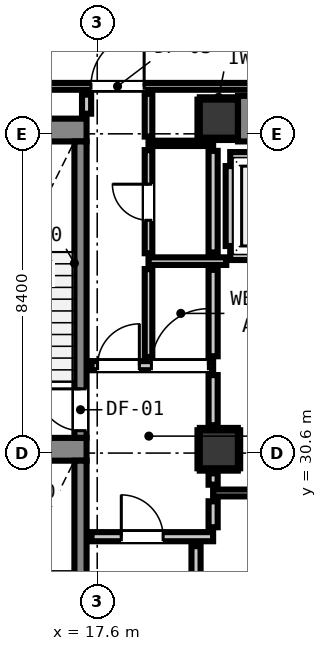
"""IFC4 building model, lengths in metres.
Left out: names, types, materials, properties, quantities, classifications, styles, units other than length and angle.
Written with IfcOpenShell. Run it as: python <this file> out.ifc"""

import sys

from ifc_helpers import new_model, si_unit, direction, frame, frame_2d, origin, origin_2d, place, context, subcontext, project, spatial, rectangle, extrude, element, fill, save


model = new_model("IFC4")
c1 = context("Model", 3, precision=1e-05, world=origin(), true_north=direction((0.0, 1.0)))
c2 = subcontext(c1, "Body", "Model", "MODEL_VIEW")
j1 = project(units=[si_unit("LENGTHUNIT", "METRE"), si_unit("PLANEANGLEUNIT", "RADIAN")], contexts=[c1])
p1 = place(None, origin())
s1 = spatial("IfcSite", under=j1, at=p1, CompositionType="ELEMENT")
p2 = place(p1, origin())
s2 = spatial("IfcBuilding", under=s1, at=p2, CompositionType="ELEMENT")
p3 = place(p2, frame((0.0, 0.0, 9.4)))
s3 = spatial("IfcBuildingStorey", under=s2, at=p3, CompositionType="ELEMENT", Elevation=9.4)
p4 = place(p3, frame((20.8, 39.4, 0.0), z_axis=(0.0, 0.0, 1.0), x_axis=(1.0, 0.0, 0.0)))
e1 = element("IfcColumn", 1, at=p4, inside=s3, PredefinedType="COLUMN", context=c2, shape_type="SweptSolid", body=[
    extrude(rectangle(XDim=1.0, YDim=1.0, at=origin_2d()), origin(), (0.0, 0.0, 1.0), 4.2),
])
p5 = place(p3, frame((13.24, 39.1, 0.0), z_axis=(0.0, 0.0, 1.0), x_axis=(1.0, 0.0, 0.0)))
e2 = element("IfcWall", 2, at=p5, inside=s3, PredefinedType="SHEAR", context=c2, shape_type="SweptSolid", body=[
    extrude(rectangle(XDim=4.08, YDim=0.6, at=frame_2d((2.04, 0.0))), origin(), (0.0, 0.0, 1.0), 4.2),
])
p6 = place(p3, frame((13.905, 30.7, 0.0), z_axis=(0.0, 0.0, 1.0), x_axis=(1.0, 0.0, 0.0)))
e3 = element("IfcWall", 3, at=p6, inside=s3, PredefinedType="SHEAR", context=c2, shape_type="SweptSolid", body=[
    extrude(rectangle(XDim=3.415, YDim=0.6, at=frame_2d((1.708, 0.0))), origin(), (0.0, 0.0, 1.0), 4.2),
])
p7 = place(p3, frame((21.305, 39.4, 0.0), z_axis=(0.0, 0.0, 1.0), x_axis=(1.0, 0.0, 0.0)))
e4 = element("IfcWall", 4, at=p7, inside=s3, PredefinedType="SHEAR", context=c2, shape_type="SweptSolid", body=[
    extrude(rectangle(XDim=7.39, YDim=1.2, at=frame_2d((3.695, 0.0))), origin(), (0.0, 0.0, 1.0), 4.2),
])
p8 = place(p3, frame((17.16, 31.0, 0.0), z_axis=(0.0, 0.0, 1.0), x_axis=(0.0, 1.0, 0.0)))
e5 = element("IfcWall", 5, at=p8, inside=s3, PredefinedType="SHEAR", context=c2, shape_type="SweptSolid", body=[
    extrude(rectangle(XDim=7.8, YDim=0.32, at=frame_2d((3.9, 0.0))), origin(), (0.0, 0.0, 1.0), 4.2),
])
p9 = place(p8, frame((0.19, 0.0, 0.0)))
e6 = element("IfcOpeningElement", 6, at=p9, cuts=e5, PredefinedType="OPENING", context=c2, shape_type="SweptSolid", body=[
    extrude(rectangle(XDim=1.1, YDim=2.15, at=frame_2d((0.55, 1.075))), frame((0.0, 0.17, 0.0), z_axis=(0.0, -1.0, 0.0), x_axis=(1.0, 0.0, 0.0)), (0.0, 0.0, 1.0), 0.34),
])
p10 = place(p3, frame((17.16, 22.6, 0.0), z_axis=(0.0, 0.0, 1.0), x_axis=(0.0, 1.0, 0.0)))
e7 = element("IfcWall", 7, at=p10, inside=s3, PredefinedType="SHEAR", context=c2, shape_type="SweptSolid", body=[
    extrude(rectangle(XDim=7.8, YDim=0.32, at=frame_2d((3.9, 0.0))), origin(), (0.0, 0.0, 1.0), 4.2),
])
p11 = place(p10, frame((0.19, 0.0, 0.0)))
e8 = element("IfcOpeningElement", 8, at=p11, cuts=e7, PredefinedType="OPENING", context=c2, shape_type="SweptSolid", body=[
    extrude(rectangle(XDim=1.1, YDim=2.15, at=frame_2d((0.55, 1.075))), frame((0.0, 0.17, 0.0), z_axis=(0.0, -1.0, 0.0), x_axis=(1.0, 0.0, 0.0)), (0.0, 0.0, 1.0), 0.34),
])
p12 = place(p3, frame((20.8, 30.7, 0.0), z_axis=(0.0, 0.0, 1.0), x_axis=(1.0, 0.0, 0.0)))
e9 = element("IfcColumn", 9, at=p12, inside=s3, PredefinedType="COLUMN", context=c2, shape_type="SweptSolid", body=[
    extrude(rectangle(XDim=1.0, YDim=1.0, at=origin_2d()), origin(), (0.0, 0.0, 1.0), 4.2),
])
for number, where, z_axis, x_axis in (
    (10, (21.1, 35.8, 0.0), (0.0, 0.0, 1.0), (1.0, 0.0, 0.0)),
    (11, (21.1, 38.4, 0.0), (0.0, 0.0, 1.0), (1.0, 0.0, 0.0)),
):
    element("IfcWall", number, at=place(p3, frame(where, z_axis=z_axis, x_axis=x_axis)), inside=s3, PredefinedType="PARTITIONING", context=c2, shape_type="SweptSolid", body=[
        extrude(rectangle(XDim=2.2, YDim=0.24, at=frame_2d((1.1, 0.0))), origin(), (0.0, 0.0, 1.0), 3.92),
    ])
p13 = place(p3, frame((21.1, 36.048, 0.0), z_axis=(0.0, 0.0, 1.0), x_axis=(0.0, 1.0, 0.0)))
e12 = element("IfcWall", 12, at=p13, inside=s3, PredefinedType="PARTITIONING", context=c2, shape_type="SweptSolid", body=[
    extrude(rectangle(XDim=2.104, YDim=0.24, at=frame_2d((1.052, 0.0))), origin(), (0.0, 0.0, 1.0), 2.955),
])
p14 = place(p3, frame((17.45, 28.4, 0.0), z_axis=(0.0, 0.0, 1.0), x_axis=(1.0, 0.0, 0.0)))
e13 = element("IfcWall", 13, at=p14, inside=s3, PredefinedType="PARTITIONING", context=c2, shape_type="SweptSolid", body=[
    extrude(rectangle(XDim=3.2, YDim=0.24, at=frame_2d((1.6, 0.0))), origin(), (0.0, 0.0, 1.0), 3.92),
])
p15 = place(p14, frame((0.784, 0.0, 0.0)))
e14 = element("IfcOpeningElement", 14, at=p15, cuts=e13, PredefinedType="OPENING", context=c2, shape_type="SweptSolid", body=[
    extrude(rectangle(XDim=1.1, YDim=2.15, at=frame_2d((0.55, 1.075))), frame((0.0, 0.13, 0.0), z_axis=(0.0, -1.0, 0.0), x_axis=(1.0, 0.0, 0.0)), (0.0, 0.0, 1.0), 0.26),
])
p16 = place(p3, frame((17.45, 32.9, 0.0), z_axis=(0.0, 0.0, 1.0), x_axis=(1.0, 0.0, 0.0)))
e15 = element("IfcWall", 15, at=p16, inside=s3, PredefinedType="PARTITIONING", context=c2, shape_type="SweptSolid", body=[
    extrude(rectangle(XDim=3.2, YDim=0.24, at=frame_2d((1.6, 0.0))), origin(), (0.0, 0.0, 1.0), 3.92),
])
p17 = place(p16, frame((0.159, 0.0, 0.0)))
e16 = element("IfcOpeningElement", 16, at=p17, cuts=e15, PredefinedType="OPENING", context=c2, shape_type="SweptSolid", body=[
    extrude(rectangle(XDim=1.1, YDim=2.15, at=frame_2d((0.55, 1.075))), frame((0.0, 0.13, 0.0), z_axis=(0.0, -1.0, 0.0), x_axis=(1.0, 0.0, 0.0)), (0.0, 0.0, 1.0), 0.26),
])
p18 = place(p16, frame((1.576, 0.0, 0.0)))
e17 = element("IfcOpeningElement", 17, at=p18, cuts=e15, PredefinedType="OPENING", context=c2, shape_type="SweptSolid", body=[
    extrude(rectangle(XDim=1.5, YDim=2.15, at=frame_2d((0.75, 1.075))), frame((0.0, 0.13, 0.0), z_axis=(0.0, -1.0, 0.0), x_axis=(1.0, 0.0, 0.0)), (0.0, 0.0, 1.0), 0.26),
])
p19 = place(p3, frame((18.95, 35.65, 0.0), z_axis=(0.0, 0.0, 1.0), x_axis=(1.0, 0.0, 0.0)))
e18 = element("IfcWall", 18, at=p19, inside=s3, PredefinedType="PARTITIONING", context=c2, shape_type="SweptSolid", body=[
    extrude(rectangle(XDim=2.046, YDim=0.2, at=frame_2d((1.023, 0.0))), origin(), (0.0, 0.0, 1.0), 3.92),
])
p20 = place(p3, frame((20.65, 29.55, 0.0), z_axis=(0.0, 0.0, 1.0), x_axis=(1.0, 0.0, 0.0)))
e19 = element("IfcWall", 19, at=p20, inside=s3, PredefinedType="PARTITIONING", context=c2, shape_type="SweptSolid", body=[
    extrude(rectangle(XDim=9.325, YDim=0.18, at=frame_2d((4.663, 0.0))), origin(), (0.0, 0.0, 1.0), 3.92),
])
p21 = place(p3, frame((10.5, 40.25, 0.0), z_axis=(0.0, 0.0, 1.0), x_axis=(1.0, 0.0, 0.0)))
e20 = element("IfcWall", 20, at=p21, inside=s3, PredefinedType="PARTITIONING", context=c2, shape_type="SweptSolid", body=[
    extrude(rectangle(XDim=37.148, YDim=0.18, at=frame_2d((18.574, 0.0))), origin(), (0.0, 0.0, 1.0), 3.92),
])
p22 = place(p21, frame((6.935, 0.0, 0.0)))
e21 = element("IfcOpeningElement", 21, at=p22, cuts=e20, PredefinedType="OPENING", context=c2, shape_type="SweptSolid", body=[
    extrude(rectangle(XDim=1.4, YDim=2.15, at=frame_2d((0.7, 1.075))), frame((0.0, 0.1, 0.0), z_axis=(0.0, -1.0, 0.0), x_axis=(1.0, 0.0, 0.0)), (0.0, 0.0, 1.0), 0.2),
])
p23 = place(p21, frame((0.324, 0.0, 0.0)))
e22 = element("IfcOpeningElement", 22, at=p23, cuts=e20, PredefinedType="OPENING", context=c2, shape_type="SweptSolid", body=[
    extrude(rectangle(XDim=1.4, YDim=2.15, at=frame_2d((0.7, 1.075))), frame((0.0, 0.1, 0.0), z_axis=(0.0, -1.0, 0.0), x_axis=(1.0, 0.0, 0.0)), (0.0, 0.0, 1.0), 0.2),
])
p24 = place(p21, frame((27.05, 0.0, 0.0)))
e23 = element("IfcOpeningElement", 23, at=p24, cuts=e20, PredefinedType="OPENING", context=c2, shape_type="SweptSolid", body=[
    extrude(rectangle(XDim=1.4, YDim=2.15, at=frame_2d((0.7, 1.075))), frame((0.0, 0.1, 0.0), z_axis=(0.0, -1.0, 0.0), x_axis=(1.0, 0.0, 0.0)), (0.0, 0.0, 1.0), 0.2),
])
p25 = place(p3, frame((18.95, 38.75, 0.0), z_axis=(0.0, 0.0, 1.0), x_axis=(1.0, 0.0, 0.0)))
e24 = element("IfcWall", 24, at=p25, inside=s3, PredefinedType="PARTITIONING", context=c2, shape_type="SweptSolid", body=[
    extrude(rectangle(XDim=1.7, YDim=0.14, at=frame_2d((0.85, 0.0))), origin(), (0.0, 0.0, 1.0), 3.92),
])
p26 = place(p3, frame((17.32, 39.53, 0.0), z_axis=(0.0, 0.0, 1.0), x_axis=(0.0, 1.0, 0.0)))
e25 = element("IfcWall", 25, at=p26, inside=s3, PredefinedType="PARTITIONING", context=c2, shape_type="SweptSolid", body=[
    extrude(rectangle(XDim=0.502, YDim=0.24, at=frame_2d((0.251, 0.0))), origin(), (0.0, 0.0, 1.0), 3.92),
])
p27 = place(p3, frame((20.2, 22.586, 0.0), z_axis=(0.0, 0.0, 1.0), x_axis=(0.0, 1.0, 0.0)))
e26 = element("IfcWall", 26, at=p27, inside=s3, PredefinedType="PARTITIONING", context=c2, shape_type="SweptSolid", body=[
    extrude(rectangle(XDim=5.566, YDim=0.24, at=frame_2d((2.783, 0.0))), origin(), (0.0, 0.0, 1.0), 3.92),
])
p28 = place(p3, frame((20.65, 28.648, 0.0), z_axis=(0.0, 0.0, 1.0), x_axis=(0.0, 1.0, 0.0)))
e27 = element("IfcWall", 27, at=p28, inside=s3, PredefinedType="PARTITIONING", context=c2, shape_type="SweptSolid", body=[
    extrude(rectangle(XDim=0.684, YDim=0.24, at=frame_2d((0.342, 0.0))), origin(), (0.0, 0.0, 1.0), 2.955),
])
p29 = place(p3, frame((20.65, 29.768, 0.0), z_axis=(0.0, 0.0, 1.0), x_axis=(0.0, 1.0, 0.0)))
e28 = element("IfcWall", 28, at=p29, inside=s3, PredefinedType="PARTITIONING", context=c2, shape_type="SweptSolid", body=[
    extrude(rectangle(XDim=0.3, YDim=0.24, at=frame_2d((0.15, 0.0))), origin(), (0.0, 0.0, 1.0), 2.955),
])
p30 = place(p3, frame((20.65, 31.332, 0.0), z_axis=(0.0, 0.0, 1.0), x_axis=(0.0, 1.0, 0.0)))
e29 = element("IfcWall", 29, at=p30, inside=s3, PredefinedType="PARTITIONING", context=c2, shape_type="SweptSolid", body=[
    extrude(rectangle(XDim=1.32, YDim=0.24, at=frame_2d((0.66, 0.0))), origin(), (0.0, 0.0, 1.0), 2.955),
])
p31 = place(p3, frame((20.65, 33.148, 0.0), z_axis=(0.0, 0.0, 1.0), x_axis=(0.0, 1.0, 0.0)))
e30 = element("IfcWall", 30, at=p31, inside=s3, PredefinedType="PARTITIONING", context=c2, shape_type="SweptSolid", body=[
    extrude(rectangle(XDim=2.274, YDim=0.24, at=frame_2d((1.137, 0.0))), origin(), (0.0, 0.0, 1.0), 2.955),
])
p32 = place(p3, frame((20.65, 35.878, 0.0), z_axis=(0.0, 0.0, 1.0), x_axis=(0.0, 1.0, 0.0)))
e31 = element("IfcWall", 31, at=p32, inside=s3, PredefinedType="PARTITIONING", context=c2, shape_type="SweptSolid", body=[
    extrude(rectangle(XDim=2.674, YDim=0.24, at=frame_2d((1.337, 0.0))), origin(), (0.0, 0.0, 1.0), 2.955),
])
p33 = place(p3, frame((18.95, 33.128, 0.0), z_axis=(0.0, 0.0, 1.0), x_axis=(0.0, 1.0, 0.0)))
e32 = element("IfcWall", 32, at=p33, inside=s3, PredefinedType="PARTITIONING", context=c2, shape_type="SweptSolid", body=[
    extrude(rectangle(XDim=2.314, YDim=0.2, at=frame_2d((1.157, 0.0))), origin(), (0.0, 0.0, 1.0), 3.92),
])
p34 = place(p3, frame((18.95, 35.858, 0.0), z_axis=(0.0, 0.0, 1.0), x_axis=(0.0, 1.0, 0.0)))
e33 = element("IfcWall", 33, at=p34, inside=s3, PredefinedType="PARTITIONING", context=c2, shape_type="SweptSolid", body=[
    extrude(rectangle(XDim=2.714, YDim=0.2, at=frame_2d((1.357, 0.0))), origin(), (0.0, 0.0, 1.0), 3.92),
])
p35 = place(p34, frame((0.867, 0.0, 0.0)))
e34 = element("IfcOpeningElement", 34, at=p35, cuts=e33, PredefinedType="OPENING", context=c2, shape_type="SweptSolid", body=[
    extrude(rectangle(XDim=0.95, YDim=2.1, at=frame_2d((0.475, 1.05))), frame((0.0, 0.11, 0.0), z_axis=(0.0, -1.0, 0.0), x_axis=(1.0, 0.0, 0.0)), (0.0, 0.0, 1.0), 0.22),
])
p36 = place(p3, frame((18.95, 38.928, 0.0), z_axis=(0.0, 0.0, 1.0), x_axis=(0.0, 1.0, 0.0)))
e35 = element("IfcWall", 35, at=p36, inside=s3, PredefinedType="PARTITIONING", context=c2, shape_type="SweptSolid", body=[
    extrude(rectangle(XDim=1.124, YDim=0.2, at=frame_2d((0.562, 0.0))), origin(), (0.0, 0.0, 1.0), 3.92),
])
for number, where, z_axis, x_axis in (
    (36, (20.3, 38.868, 0.0), (0.0, 0.0, 1.0), (1.0, 0.0, 0.0)),
    (37, (20.3, 39.932, 0.0), (0.0, 0.0, 1.0), (1.0, 0.0, 0.0)),
):
    element("IfcWall", number, at=place(p3, frame(where, z_axis=z_axis, x_axis=x_axis)), inside=s3, PredefinedType="PARTITIONING", context=c2, shape_type="SweptSolid", body=[
        extrude(rectangle(XDim=0.99, YDim=0.06, at=frame_2d((0.495, 0.0))), origin(), (0.0, 0.0, 1.0), 1.45),
    ])
for number, where, z_axis, x_axis in (
    (38, (20.268, 38.9, 0.0), (0.0, 0.0, 1.0), (0.0, 1.0, 0.0)),
    (39, (20.3, 30.168, 0.0), (0.0, 0.0, 1.0), (1.0, 0.0, 0.0)),
    (40, (20.3, 31.232, 0.0), (0.0, 0.0, 1.0), (1.0, 0.0, 0.0)),
    (41, (20.268, 30.2, 0.0), (0.0, 0.0, 1.0), (0.0, 1.0, 0.0)),
    (42, (21.332, 30.2, 0.0), (0.0, 0.0, 1.0), (0.0, 1.0, 0.0)),
):
    element("IfcWall", number, at=place(p3, frame(where, z_axis=z_axis, x_axis=x_axis)), inside=s3, PredefinedType="PARTITIONING", context=c2, shape_type="SweptSolid", body=[
        extrude(rectangle(XDim=1.0, YDim=0.06, at=frame_2d((0.5, 0.0))), origin(), (0.0, 0.0, 1.0), 1.45),
    ])
p37 = place(p9, origin())
e43 = element("IfcDoor", 43, at=p37, inside=s3, OperationType="SINGLE_SWING_RIGHT", PredefinedType="DOOR", context=c2, shape_type="SweptSolid", body=[
    extrude(rectangle(XDim=1.1, YDim=2.15, at=frame_2d((0.55, 1.075))), frame((0.0, 0.025, 0.0), z_axis=(0.0, -1.0, 0.0), x_axis=(1.0, 0.0, 0.0)), (0.0, 0.0, 1.0), 0.05),
])
fill(e6, e43)
p38 = place(p15, origin())
e44 = element("IfcDoor", 44, at=p38, inside=s3, OperationType="SINGLE_SWING_LEFT", PredefinedType="DOOR", context=c2, shape_type="SweptSolid", body=[
    extrude(rectangle(XDim=1.1, YDim=2.15, at=frame_2d((0.55, 1.075))), frame((0.0, 0.025, 0.0), z_axis=(0.0, -1.0, 0.0), x_axis=(1.0, 0.0, 0.0)), (0.0, 0.0, 1.0), 0.05),
])
fill(e14, e44)
p39 = place(p17, origin())
e45 = element("IfcDoor", 45, at=p39, inside=s3, OperationType="SINGLE_SWING_RIGHT", PredefinedType="DOOR", context=c2, shape_type="SweptSolid", body=[
    extrude(rectangle(XDim=1.1, YDim=2.15, at=frame_2d((0.55, 1.075))), frame((0.0, 0.025, 0.0), z_axis=(0.0, -1.0, 0.0), x_axis=(1.0, 0.0, 0.0)), (0.0, 0.0, 1.0), 0.05),
])
fill(e16, e45)
p40 = place(p22, origin())
e46 = element("IfcDoor", 46, at=p40, inside=s3, OperationType="SINGLE_SWING_RIGHT", PredefinedType="DOOR", context=c2, shape_type="SweptSolid", body=[
    extrude(rectangle(XDim=1.4, YDim=2.15, at=frame_2d((0.7, 1.075))), frame((0.0, 0.025, 0.0), z_axis=(0.0, -1.0, 0.0), x_axis=(1.0, 0.0, 0.0)), (0.0, 0.0, 1.0), 0.05),
])
fill(e21, e46)
p41 = place(p18, origin())
e47 = element("IfcDoor", 47, at=p41, inside=s3, OperationType="SINGLE_SWING_RIGHT", PredefinedType="DOOR", context=c2, shape_type="SweptSolid", body=[
    extrude(rectangle(XDim=1.5, YDim=2.15, at=frame_2d((0.75, 1.075))), frame((0.0, 0.025, 0.0), z_axis=(0.0, -1.0, 0.0), x_axis=(1.0, 0.0, 0.0)), (0.0, 0.0, 1.0), 0.05),
])
fill(e17, e47)
p42 = place(p35, origin())
e48 = element("IfcDoor", 48, at=p42, inside=s3, OperationType="SINGLE_SWING_RIGHT", PredefinedType="DOOR", context=c2, shape_type="SweptSolid", body=[
    extrude(rectangle(XDim=0.95, YDim=2.1, at=frame_2d((0.475, 1.05))), frame((0.0, 0.025, 0.0), z_axis=(0.0, -1.0, 0.0), x_axis=(1.0, 0.0, 0.0)), (0.0, 0.0, 1.0), 0.05),
])
fill(e34, e48)
save(model, sys.argv[1])
